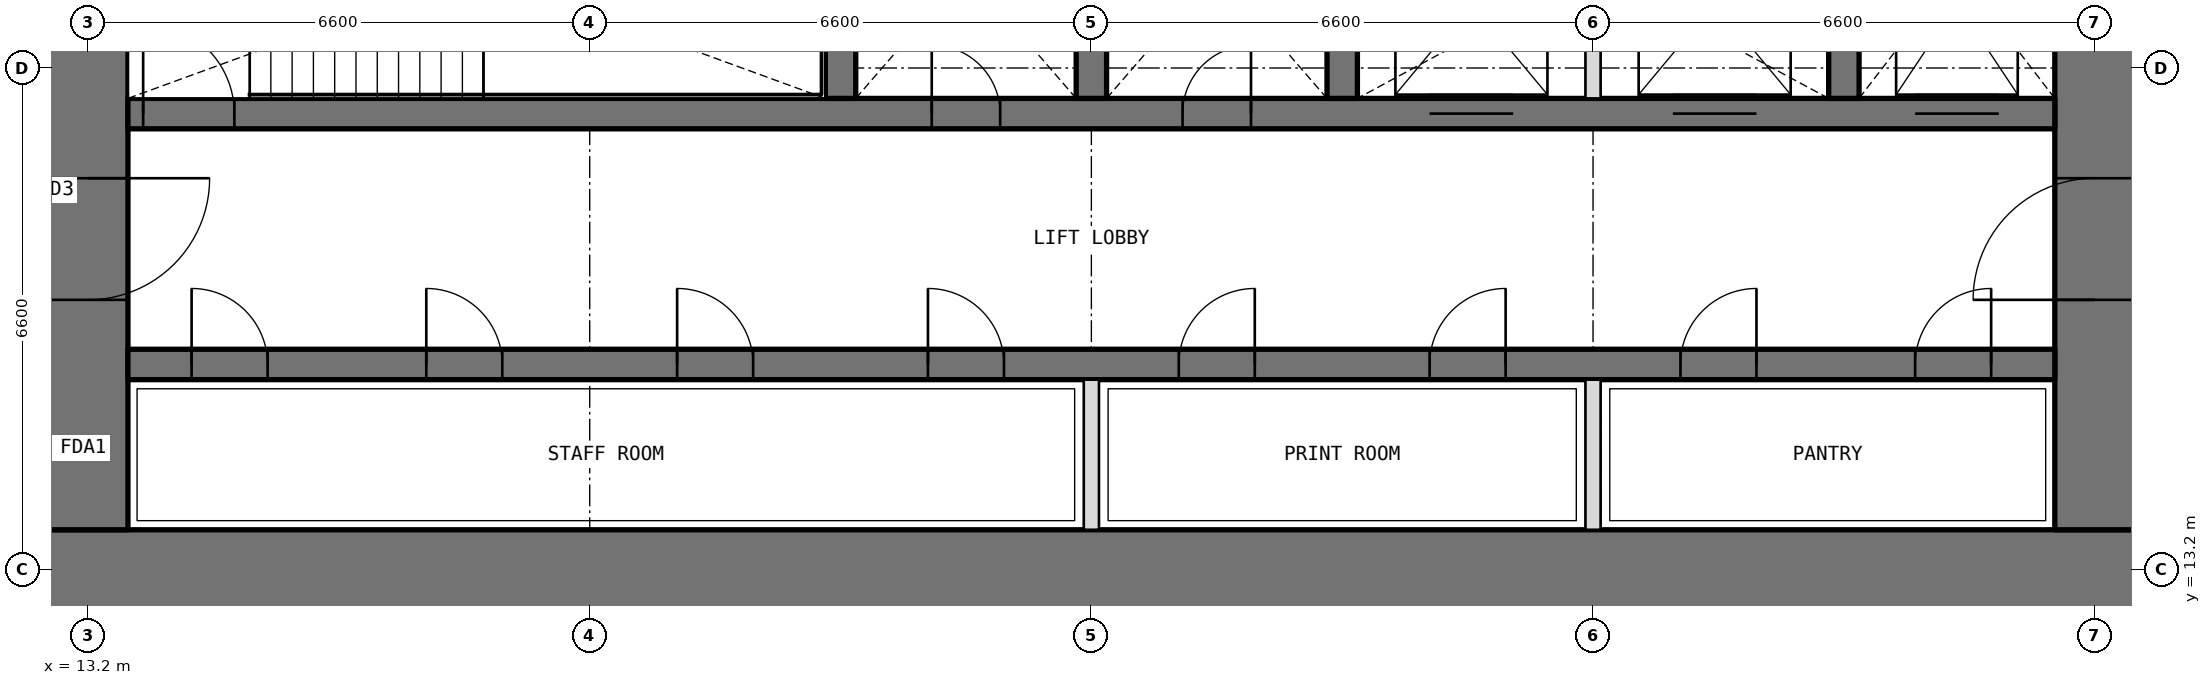
"""IFC4 building model, lengths in metres.
Left out: names, types, materials, properties, quantities, classifications, styles, units other than length and angle.
Written with IfcOpenShell. Run it as: python <this file> out.ifc"""

import sys

from ifc_helpers import new_model, si_unit, direction, frame, frame_2d, origin, place, context, subcontext, project, spatial, rectangle, extrude, element, fill, save


model = new_model("IFC4")
c1 = context("Model", 3, precision=1e-05, world=origin(), true_north=direction((0.0, 1.0)))
c2 = subcontext(c1, "Body", "Model", "MODEL_VIEW")
j1 = project(units=[si_unit("LENGTHUNIT", "METRE"), si_unit("PLANEANGLEUNIT", "RADIAN")], contexts=[c1])
p1 = place(None, origin())
s1 = spatial("IfcSite", under=j1, at=p1, CompositionType="ELEMENT")
p2 = place(p1, origin())
s2 = spatial("IfcBuilding", under=s1, at=p2, CompositionType="ELEMENT")
p3 = place(p2, frame((0.0, 0.0, 262.8)))
s3 = spatial("IfcBuildingStorey", under=s2, at=p3, CompositionType="ELEMENT", Elevation=262.8)
p4 = place(p3, frame((12.675, 13.2, 0.0), z_axis=(0.0, 0.0, 1.0), x_axis=(1.0, 0.0, 0.0)))
e1 = element("IfcWall", 1, at=p4, inside=s3, PredefinedType="SHEAR", context=c2, shape_type="SweptSolid", body=[
    extrude(rectangle(XDim=27.45, YDim=1.05, at=frame_2d((13.725, 0.0))), origin(), (0.0, 0.0, 1.0), 4.2),
])
p5 = place(p3, frame((39.6, 13.725, 0.0), z_axis=(0.0, 0.0, 1.0), x_axis=(0.0, 1.0, 0.0)))
e2 = element("IfcWall", 2, at=p5, inside=s3, PredefinedType="SHEAR", context=c2, shape_type="SweptSolid", body=[
    extrude(rectangle(XDim=18.75, YDim=1.05, at=frame_2d((9.375, 0.0))), origin(), (0.0, 0.0, 1.0), 4.2),
])
p6 = place(p5, frame((3.025, 0.0, 0.0)))
e3 = element("IfcOpeningElement", 3, at=p6, cuts=e2, PredefinedType="OPENING", context=c2, shape_type="SweptSolid", body=[
    extrude(rectangle(XDim=1.6, YDim=2.1, at=frame_2d((0.8, 1.05))), frame((0.0, 0.535, 0.0), z_axis=(0.0, -1.0, 0.0), x_axis=(1.0, 0.0, 0.0)), (0.0, 0.0, 1.0), 1.07),
])
p7 = place(p5, frame((13.825, 0.0, 0.0)))
e4 = element("IfcOpeningElement", 4, at=p7, cuts=e2, PredefinedType="OPENING", context=c2, shape_type="SweptSolid", body=[
    extrude(rectangle(XDim=1.6, YDim=2.1, at=frame_2d((0.8, 1.05))), frame((0.0, 0.535, 0.0), z_axis=(0.0, -1.0, 0.0), x_axis=(1.0, 0.0, 0.0)), (0.0, 0.0, 1.0), 1.07),
])
p8 = place(p3, frame((13.2, 32.475, 0.0), z_axis=(0.0, 0.0, 1.0), x_axis=(0.0, -1.0, 0.0)))
e5 = element("IfcWall", 5, at=p8, inside=s3, PredefinedType="SHEAR", context=c2, shape_type="SweptSolid", body=[
    extrude(rectangle(XDim=18.75, YDim=1.05, at=frame_2d((9.375, 0.0))), origin(), (0.0, 0.0, 1.0), 4.2),
])
p9 = place(p8, frame((14.125, 0.0, 0.0)))
e6 = element("IfcOpeningElement", 6, at=p9, cuts=e5, PredefinedType="OPENING", context=c2, shape_type="SweptSolid", body=[
    extrude(rectangle(XDim=1.6, YDim=2.1, at=frame_2d((0.8, 1.05))), frame((0.0, 0.535, 0.0), z_axis=(0.0, -1.0, 0.0), x_axis=(1.0, 0.0, 0.0)), (0.0, 0.0, 1.0), 1.07),
])
p10 = place(p8, frame((3.325, 0.0, 0.0)))
e7 = element("IfcOpeningElement", 7, at=p10, cuts=e5, PredefinedType="OPENING", context=c2, shape_type="SweptSolid", body=[
    extrude(rectangle(XDim=1.6, YDim=2.1, at=frame_2d((0.8, 1.05))), frame((0.0, 0.535, 0.0), z_axis=(0.0, -1.0, 0.0), x_axis=(1.0, 0.0, 0.0)), (0.0, 0.0, 1.0), 1.07),
])
p11 = place(p3, frame((13.725, 15.9, 0.0), z_axis=(0.0, 0.0, 1.0), x_axis=(1.0, 0.0, 0.0)))
e8 = element("IfcWall", 8, at=p11, inside=s3, PredefinedType="SHEAR", context=c2, shape_type="SweptSolid", body=[
    extrude(rectangle(XDim=25.35, YDim=0.4, at=frame_2d((12.675, 0.0))), origin(), (0.0, 0.0, 1.0), 4.2),
])
p12 = place(p11, frame((0.837, 0.0, 0.0)))
e9 = element("IfcOpeningElement", 9, at=p12, cuts=e8, PredefinedType="OPENING", context=c2, shape_type="SweptSolid", body=[
    extrude(rectangle(XDim=1.0, YDim=2.1, at=frame_2d((0.5, 1.05))), frame((0.0, 0.21, 0.0), z_axis=(0.0, -1.0, 0.0), x_axis=(1.0, 0.0, 0.0)), (0.0, 0.0, 1.0), 0.42),
])
p13 = place(p11, frame((3.925, 0.0, 0.0)))
e10 = element("IfcOpeningElement", 10, at=p13, cuts=e8, PredefinedType="OPENING", context=c2, shape_type="SweptSolid", body=[
    extrude(rectangle(XDim=1.0, YDim=2.1, at=frame_2d((0.5, 1.05))), frame((0.0, 0.21, 0.0), z_axis=(0.0, -1.0, 0.0), x_axis=(1.0, 0.0, 0.0)), (0.0, 0.0, 1.0), 0.42),
])
p14 = place(p11, frame((7.225, 0.0, 0.0)))
e11 = element("IfcOpeningElement", 11, at=p14, cuts=e8, PredefinedType="OPENING", context=c2, shape_type="SweptSolid", body=[
    extrude(rectangle(XDim=1.0, YDim=2.1, at=frame_2d((0.5, 1.05))), frame((0.0, 0.21, 0.0), z_axis=(0.0, -1.0, 0.0), x_axis=(1.0, 0.0, 0.0)), (0.0, 0.0, 1.0), 0.42),
])
p15 = place(p11, frame((10.525, 0.0, 0.0)))
e12 = element("IfcOpeningElement", 12, at=p15, cuts=e8, PredefinedType="OPENING", context=c2, shape_type="SweptSolid", body=[
    extrude(rectangle(XDim=1.0, YDim=2.1, at=frame_2d((0.5, 1.05))), frame((0.0, 0.21, 0.0), z_axis=(0.0, -1.0, 0.0), x_axis=(1.0, 0.0, 0.0)), (0.0, 0.0, 1.0), 0.42),
])
p16 = place(p11, frame((13.825, 0.0, 0.0)))
e13 = element("IfcOpeningElement", 13, at=p16, cuts=e8, PredefinedType="OPENING", context=c2, shape_type="SweptSolid", body=[
    extrude(rectangle(XDim=1.0, YDim=2.1, at=frame_2d((0.5, 1.05))), frame((0.0, 0.21, 0.0), z_axis=(0.0, -1.0, 0.0), x_axis=(1.0, 0.0, 0.0)), (0.0, 0.0, 1.0), 0.42),
])
p17 = place(p11, frame((17.125, 0.0, 0.0)))
e14 = element("IfcOpeningElement", 14, at=p17, cuts=e8, PredefinedType="OPENING", context=c2, shape_type="SweptSolid", body=[
    extrude(rectangle(XDim=1.0, YDim=2.1, at=frame_2d((0.5, 1.05))), frame((0.0, 0.21, 0.0), z_axis=(0.0, -1.0, 0.0), x_axis=(1.0, 0.0, 0.0)), (0.0, 0.0, 1.0), 0.42),
])
p18 = place(p11, frame((20.425, 0.0, 0.0)))
e15 = element("IfcOpeningElement", 15, at=p18, cuts=e8, PredefinedType="OPENING", context=c2, shape_type="SweptSolid", body=[
    extrude(rectangle(XDim=1.0, YDim=2.1, at=frame_2d((0.5, 1.05))), frame((0.0, 0.21, 0.0), z_axis=(0.0, -1.0, 0.0), x_axis=(1.0, 0.0, 0.0)), (0.0, 0.0, 1.0), 0.42),
])
p19 = place(p11, frame((23.512, 0.0, 0.0)))
e16 = element("IfcOpeningElement", 16, at=p19, cuts=e8, PredefinedType="OPENING", context=c2, shape_type="SweptSolid", body=[
    extrude(rectangle(XDim=1.0, YDim=2.1, at=frame_2d((0.5, 1.05))), frame((0.0, 0.21, 0.0), z_axis=(0.0, -1.0, 0.0), x_axis=(1.0, 0.0, 0.0)), (0.0, 0.0, 1.0), 0.42),
])
p20 = place(p3, frame((13.725, 19.2, 0.0), z_axis=(0.0, 0.0, 1.0), x_axis=(1.0, 0.0, 0.0)))
e17 = element("IfcWall", 17, at=p20, inside=s3, PredefinedType="SHEAR", context=c2, shape_type="SweptSolid", body=[
    extrude(rectangle(XDim=25.35, YDim=0.4, at=frame_2d((12.675, 0.0))), origin(), (0.0, 0.0, 1.0), 4.2),
])
p21 = place(p20, frame((10.575, 0.0, 0.0)))
e18 = element("IfcOpeningElement", 18, at=p21, cuts=e17, PredefinedType="OPENING", context=c2, shape_type="SweptSolid", body=[
    extrude(rectangle(XDim=0.9, YDim=2.1, at=frame_2d((0.45, 1.05))), frame((0.0, 0.21, 0.0), z_axis=(0.0, -1.0, 0.0), x_axis=(1.0, 0.0, 0.0)), (0.0, 0.0, 1.0), 0.42),
])
p22 = place(p20, frame((13.875, 0.0, 0.0)))
e19 = element("IfcOpeningElement", 19, at=p22, cuts=e17, PredefinedType="OPENING", context=c2, shape_type="SweptSolid", body=[
    extrude(rectangle(XDim=0.9, YDim=2.1, at=frame_2d((0.45, 1.05))), frame((0.0, 0.21, 0.0), z_axis=(0.0, -1.0, 0.0), x_axis=(1.0, 0.0, 0.0)), (0.0, 0.0, 1.0), 0.42),
])
p23 = place(p20, frame((0.2, 0.0, 0.0)))
e20 = element("IfcOpeningElement", 20, at=p23, cuts=e17, PredefinedType="OPENING", context=c2, shape_type="SweptSolid", body=[
    extrude(rectangle(XDim=1.2, YDim=2.1, at=frame_2d((0.6, 1.05))), frame((0.0, 0.21, 0.0), z_axis=(0.0, -1.0, 0.0), x_axis=(1.0, 0.0, 0.0)), (0.0, 0.0, 1.0), 0.42),
])
p24 = place(p20, frame((23.512, 0.0, 0.0)))
e21 = element("IfcOpeningElement", 21, at=p24, cuts=e17, PredefinedType="OPENING", context=c2, shape_type="SweptSolid", body=[
    extrude(rectangle(XDim=1.1, YDim=2.1, at=frame_2d((0.55, 1.05))), frame((0.0, 0.21, 0.0), z_axis=(0.0, -1.0, 0.0), x_axis=(1.0, 0.0, 0.0)), (0.0, 0.0, 1.0), 0.42),
])
p25 = place(p20, frame((17.125, 0.0, 0.0)))
e22 = element("IfcOpeningElement", 22, at=p25, cuts=e17, PredefinedType="OPENING", context=c2, shape_type="SweptSolid", body=[
    extrude(rectangle(XDim=1.1, YDim=2.1, at=frame_2d((0.55, 1.05))), frame((0.0, 0.21, 0.0), z_axis=(0.0, -1.0, 0.0), x_axis=(1.0, 0.0, 0.0)), (0.0, 0.0, 1.0), 0.42),
])
p26 = place(p20, frame((20.325, 0.0, 0.0)))
e23 = element("IfcOpeningElement", 23, at=p26, cuts=e17, PredefinedType="OPENING", context=c2, shape_type="SweptSolid", body=[
    extrude(rectangle(XDim=1.1, YDim=2.1, at=frame_2d((0.55, 1.05))), frame((0.0, 0.21, 0.0), z_axis=(0.0, -1.0, 0.0), x_axis=(1.0, 0.0, 0.0)), (0.0, 0.0, 1.0), 0.42),
])
for number, where, z_axis, x_axis in (
    (24, (23.1, 19.4, 0.0), (0.0, 0.0, 1.0), (0.0, 1.0, 0.0)),
    (25, (26.4, 19.4, 0.0), (0.0, 0.0, 1.0), (0.0, 1.0, 0.0)),
    (26, (29.7, 19.4, 0.0), (0.0, 0.0, 1.0), (0.0, 1.0, 0.0)),
    (27, (36.3, 19.4, 0.0), (0.0, 0.0, 1.0), (0.0, 1.0, 0.0)),
):
    element("IfcWall", number, at=place(p3, frame(where, z_axis=z_axis, x_axis=x_axis)), inside=s3, PredefinedType="SHEAR", context=c2, shape_type="SweptSolid", body=[
        extrude(rectangle(XDim=3.35, YDim=0.4, at=frame_2d((1.675, 0.0))), origin(), (0.0, 0.0, 1.0), 4.2),
    ])
for number, where, z_axis, x_axis in (
    (28, (26.4, 13.725, 0.0), (0.0, 0.0, 1.0), (0.0, 1.0, 0.0)),
    (29, (33.0, 13.725, 0.0), (0.0, 0.0, 1.0), (0.0, 1.0, 0.0)),
):
    element("IfcWall", number, at=place(p3, frame(where, z_axis=z_axis, x_axis=x_axis)), inside=s3, PredefinedType="PARTITIONING", context=c2, shape_type="SweptSolid", body=[
        extrude(rectangle(XDim=1.975, YDim=0.2, at=frame_2d((0.987, 0.0))), origin(), (0.0, 0.0, 1.0), 4.2),
    ])
p27 = place(p3, frame((33.0, 19.4, 0.0), z_axis=(0.0, 0.0, 1.0), x_axis=(0.0, 1.0, 0.0)))
e30 = element("IfcWall", 30, at=p27, inside=s3, PredefinedType="PARTITIONING", context=c2, shape_type="SweptSolid", body=[
    extrude(rectangle(XDim=3.35, YDim=0.2, at=frame_2d((1.675, 0.0))), origin(), (0.0, 0.0, 1.0), 4.2),
])
p28 = place(p21, origin())
e31 = element("IfcDoor", 31, at=p28, inside=s3, OperationType="SINGLE_SWING_LEFT", PredefinedType="DOOR", context=c2, shape_type="SweptSolid", body=[
    extrude(rectangle(XDim=0.9, YDim=2.1, at=frame_2d((0.45, 1.05))), frame((0.0, 0.025, 0.0), z_axis=(0.0, -1.0, 0.0), x_axis=(1.0, 0.0, 0.0)), (0.0, 0.0, 1.0), 0.05),
])
fill(e18, e31)
p29 = place(p22, origin())
e32 = element("IfcDoor", 32, at=p29, inside=s3, OperationType="SINGLE_SWING_RIGHT", PredefinedType="DOOR", context=c2, shape_type="SweptSolid", body=[
    extrude(rectangle(XDim=0.9, YDim=2.1, at=frame_2d((0.45, 1.05))), frame((0.0, 0.025, 0.0), z_axis=(0.0, -1.0, 0.0), x_axis=(1.0, 0.0, 0.0)), (0.0, 0.0, 1.0), 0.05),
])
fill(e19, e32)
p30 = place(p12, origin())
e33 = element("IfcDoor", 33, at=p30, inside=s3, OperationType="SINGLE_SWING_LEFT", PredefinedType="DOOR", context=c2, shape_type="SweptSolid", body=[
    extrude(rectangle(XDim=1.0, YDim=2.1, at=frame_2d((0.5, 1.05))), frame((0.0, 0.025, 0.0), z_axis=(0.0, -1.0, 0.0), x_axis=(1.0, 0.0, 0.0)), (0.0, 0.0, 1.0), 0.05),
])
fill(e9, e33)
p31 = place(p13, origin())
e34 = element("IfcDoor", 34, at=p31, inside=s3, OperationType="SINGLE_SWING_LEFT", PredefinedType="DOOR", context=c2, shape_type="SweptSolid", body=[
    extrude(rectangle(XDim=1.0, YDim=2.1, at=frame_2d((0.5, 1.05))), frame((0.0, 0.025, 0.0), z_axis=(0.0, -1.0, 0.0), x_axis=(1.0, 0.0, 0.0)), (0.0, 0.0, 1.0), 0.05),
])
fill(e10, e34)
p32 = place(p14, origin())
e35 = element("IfcDoor", 35, at=p32, inside=s3, OperationType="SINGLE_SWING_LEFT", PredefinedType="DOOR", context=c2, shape_type="SweptSolid", body=[
    extrude(rectangle(XDim=1.0, YDim=2.1, at=frame_2d((0.5, 1.05))), frame((0.0, 0.025, 0.0), z_axis=(0.0, -1.0, 0.0), x_axis=(1.0, 0.0, 0.0)), (0.0, 0.0, 1.0), 0.05),
])
fill(e11, e35)
p33 = place(p15, origin())
e36 = element("IfcDoor", 36, at=p33, inside=s3, OperationType="SINGLE_SWING_LEFT", PredefinedType="DOOR", context=c2, shape_type="SweptSolid", body=[
    extrude(rectangle(XDim=1.0, YDim=2.1, at=frame_2d((0.5, 1.05))), frame((0.0, 0.025, 0.0), z_axis=(0.0, -1.0, 0.0), x_axis=(1.0, 0.0, 0.0)), (0.0, 0.0, 1.0), 0.05),
])
fill(e12, e36)
p34 = place(p16, origin())
e37 = element("IfcDoor", 37, at=p34, inside=s3, OperationType="SINGLE_SWING_RIGHT", PredefinedType="DOOR", context=c2, shape_type="SweptSolid", body=[
    extrude(rectangle(XDim=1.0, YDim=2.1, at=frame_2d((0.5, 1.05))), frame((0.0, 0.025, 0.0), z_axis=(0.0, -1.0, 0.0), x_axis=(1.0, 0.0, 0.0)), (0.0, 0.0, 1.0), 0.05),
])
fill(e13, e37)
p35 = place(p17, origin())
e38 = element("IfcDoor", 38, at=p35, inside=s3, OperationType="SINGLE_SWING_RIGHT", PredefinedType="DOOR", context=c2, shape_type="SweptSolid", body=[
    extrude(rectangle(XDim=1.0, YDim=2.1, at=frame_2d((0.5, 1.05))), frame((0.0, 0.025, 0.0), z_axis=(0.0, -1.0, 0.0), x_axis=(1.0, 0.0, 0.0)), (0.0, 0.0, 1.0), 0.05),
])
fill(e14, e38)
p36 = place(p18, origin())
e39 = element("IfcDoor", 39, at=p36, inside=s3, OperationType="SINGLE_SWING_RIGHT", PredefinedType="DOOR", context=c2, shape_type="SweptSolid", body=[
    extrude(rectangle(XDim=1.0, YDim=2.1, at=frame_2d((0.5, 1.05))), frame((0.0, 0.025, 0.0), z_axis=(0.0, -1.0, 0.0), x_axis=(1.0, 0.0, 0.0)), (0.0, 0.0, 1.0), 0.05),
])
fill(e15, e39)
p37 = place(p19, origin())
e40 = element("IfcDoor", 40, at=p37, inside=s3, OperationType="SINGLE_SWING_RIGHT", PredefinedType="DOOR", context=c2, shape_type="SweptSolid", body=[
    extrude(rectangle(XDim=1.0, YDim=2.1, at=frame_2d((0.5, 1.05))), frame((0.0, 0.025, 0.0), z_axis=(0.0, -1.0, 0.0), x_axis=(1.0, 0.0, 0.0)), (0.0, 0.0, 1.0), 0.05),
])
fill(e16, e40)
p38 = place(p23, origin())
e41 = element("IfcDoor", 41, at=p38, inside=s3, OperationType="SINGLE_SWING_LEFT", PredefinedType="DOOR", context=c2, shape_type="SweptSolid", body=[
    extrude(rectangle(XDim=1.2, YDim=2.1, at=frame_2d((0.6, 1.05))), frame((0.0, 0.025, 0.0), z_axis=(0.0, -1.0, 0.0), x_axis=(1.0, 0.0, 0.0)), (0.0, 0.0, 1.0), 0.05),
])
fill(e20, e41)
p39 = place(p9, origin())
e42 = element("IfcDoor", 42, at=p39, inside=s3, OperationType="DOUBLE_DOOR_DOUBLE_SWING", PredefinedType="DOOR", context=c2, shape_type="SweptSolid", body=[
    extrude(rectangle(XDim=1.6, YDim=2.1, at=frame_2d((0.8, 1.05))), frame((0.0, 0.025, 0.0), z_axis=(0.0, -1.0, 0.0), x_axis=(1.0, 0.0, 0.0)), (0.0, 0.0, 1.0), 0.05),
])
fill(e6, e42)
p40 = place(p6, origin())
e43 = element("IfcDoor", 43, at=p40, inside=s3, OperationType="DOUBLE_DOOR_DOUBLE_SWING", PredefinedType="DOOR", context=c2, shape_type="SweptSolid", body=[
    extrude(rectangle(XDim=1.6, YDim=2.1, at=frame_2d((0.8, 1.05))), frame((0.0, 0.025, 0.0), z_axis=(0.0, -1.0, 0.0), x_axis=(1.0, 0.0, 0.0)), (0.0, 0.0, 1.0), 0.05),
])
fill(e3, e43)
p41 = place(p24, origin())
e44 = element("IfcDoor", 44, at=p41, inside=s3, OperationType="DOUBLE_DOOR_SLIDING", PredefinedType="DOOR", context=c2, shape_type="SweptSolid", body=[
    extrude(rectangle(XDim=1.1, YDim=2.1, at=frame_2d((0.55, 1.05))), frame((0.0, 0.025, 0.0), z_axis=(0.0, -1.0, 0.0), x_axis=(1.0, 0.0, 0.0)), (0.0, 0.0, 1.0), 0.05),
])
fill(e21, e44)
p42 = place(p25, origin())
e45 = element("IfcDoor", 45, at=p42, inside=s3, OperationType="DOUBLE_DOOR_SLIDING", PredefinedType="DOOR", context=c2, shape_type="SweptSolid", body=[
    extrude(rectangle(XDim=1.1, YDim=2.1, at=frame_2d((0.55, 1.05))), frame((0.0, 0.025, 0.0), z_axis=(0.0, -1.0, 0.0), x_axis=(1.0, 0.0, 0.0)), (0.0, 0.0, 1.0), 0.05),
])
fill(e22, e45)
p43 = place(p26, origin())
e46 = element("IfcDoor", 46, at=p43, inside=s3, OperationType="DOUBLE_DOOR_SLIDING", PredefinedType="DOOR", context=c2, shape_type="SweptSolid", body=[
    extrude(rectangle(XDim=1.1, YDim=2.1, at=frame_2d((0.55, 1.05))), frame((0.0, 0.025, 0.0), z_axis=(0.0, -1.0, 0.0), x_axis=(1.0, 0.0, 0.0)), (0.0, 0.0, 1.0), 0.05),
])
fill(e23, e46)
save(model, sys.argv[1])
